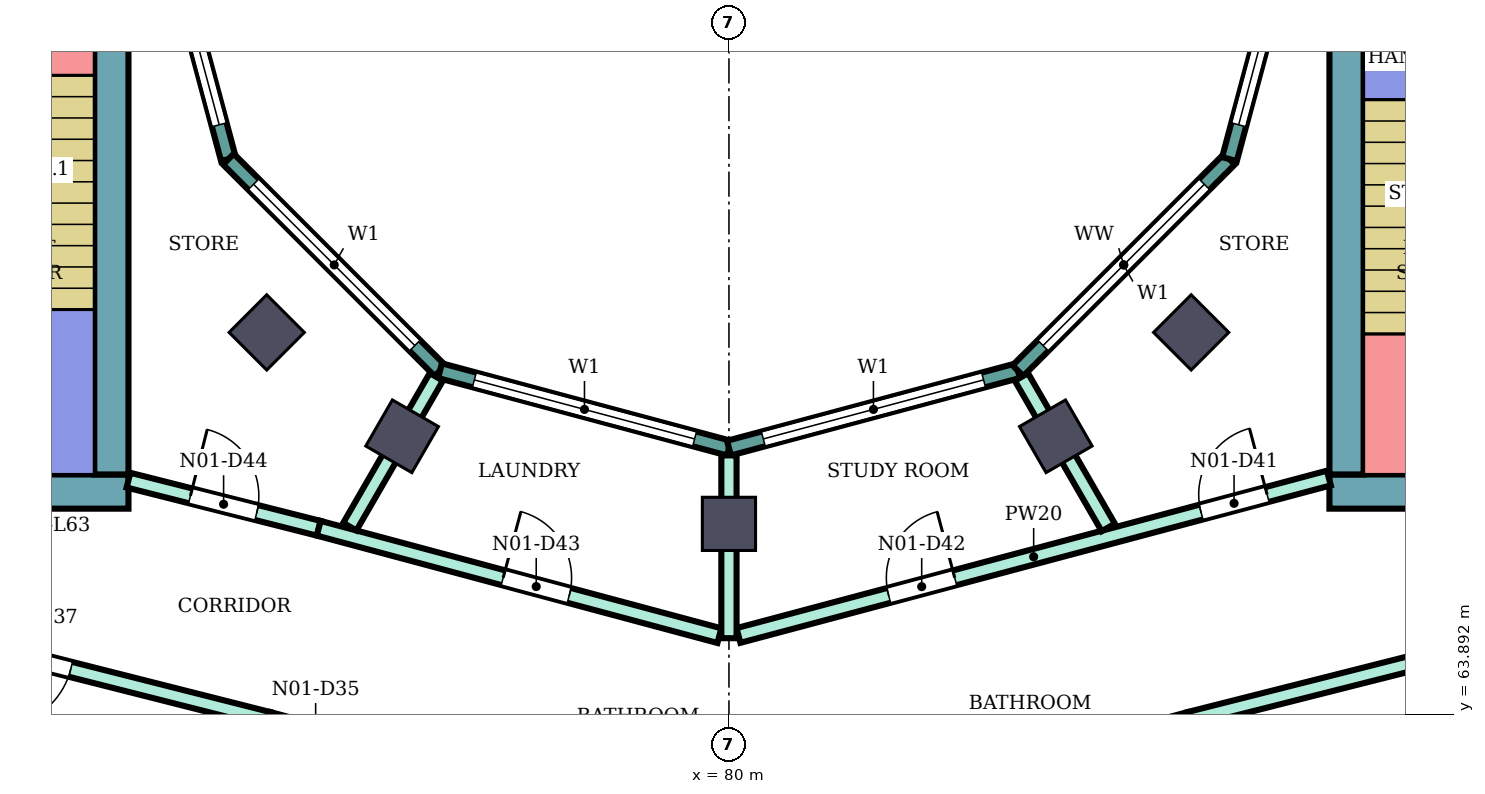
"""IFC4 building model, lengths in metres.
Left out: names, types, materials, properties, quantities, classifications, styles, units other than length and angle.
Written with IfcOpenShell. Run it as: python <this file> out.ifc"""

import sys

from ifc_helpers import new_model, si_unit, direction, frame, frame_2d, origin, origin_2d, place, context, subcontext, project, spatial, rectangle, extrude, element, fill, save


model = new_model("IFC4")
c1 = context("Model", 3, precision=1e-05, world=origin(), true_north=direction((0.0, 1.0)))
c2 = subcontext(c1, "Body", "Model", "MODEL_VIEW")
j1 = project(units=[si_unit("LENGTHUNIT", "METRE"), si_unit("PLANEANGLEUNIT", "RADIAN")], contexts=[c1])
p1 = place(None, origin())
s1 = spatial("IfcSite", under=j1, at=p1, CompositionType="ELEMENT")
p2 = place(p1, origin())
s2 = spatial("IfcBuilding", under=s1, at=p2, CompositionType="ELEMENT")
p3 = place(p2, frame((0.0, 0.0, 275.7)))
s3 = spatial("IfcBuildingStorey", under=s2, at=p3, CompositionType="ELEMENT", Elevation=275.7)
for number, where, z_axis, x_axis in (
    (1, (73.919, 68.919, 0.0), (0.0, 0.0, 1.0), (-0.707, -0.707, 0.0)),
    (2, (75.7, 67.552, 0.0), (0.0, 0.0, 1.0), (-0.5, -0.866, 0.0)),
    (3, (80.0, 66.4, 0.0), (0.0, 0.0, 1.0), (0.0, -1.0, 0.0)),
    (4, (84.3, 67.552, 0.0), (0.0, 0.0, 1.0), (0.5, -0.866, 0.0)),
    (5, (86.081, 68.919, 0.0), (0.0, 0.0, 1.0), (0.707, -0.707, 0.0)),
):
    element("IfcColumn", number, at=place(p3, frame(where, z_axis=z_axis, x_axis=x_axis)), inside=s3, PredefinedType="COLUMN", context=c2, shape_type="SweptSolid", body=[
        extrude(rectangle(XDim=0.7, YDim=0.7, at=origin_2d()), origin(), (0.0, 0.0, 1.0), 4.2),
    ])
p4 = place(p3, frame((87.9, 66.825, 0.0), z_axis=(0.0, 0.0, 1.0), x_axis=(1.0, 0.0, 0.0)))
e6 = element("IfcWall", 6, at=p4, inside=s3, PredefinedType="SHEAR", context=c2, shape_type="SweptSolid", body=[
    extrude(rectangle(XDim=13.55, YDim=0.45, at=frame_2d((6.775, 0.0))), origin(), (0.0, 0.0, 1.0), 3.88),
])
p5 = place(p4, frame((4.2, 0.0, 0.0)))
e7 = element("IfcOpeningElement", 7, at=p5, cuts=e6, PredefinedType="OPENING", context=c2, shape_type="SweptSolid", body=[
    extrude(rectangle(XDim=2.4, YDim=2.4, at=frame_2d((1.2, 1.2))), frame((0.0, 0.235, 0.0), z_axis=(0.0, -1.0, 0.0), x_axis=(1.0, 0.0, 0.0)), (0.0, 0.0, 1.0), 0.47),
])
p6 = place(p3, frame((88.125, 67.05, 0.0), z_axis=(0.0, 0.0, 1.0), x_axis=(0.0, 1.0, 0.0)))
e8 = element("IfcWall", 8, at=p6, inside=s3, PredefinedType="SHEAR", context=c2, shape_type="SweptSolid", body=[
    extrude(rectangle(XDim=7.95, YDim=0.45, at=frame_2d((3.975, 0.0))), origin(), (0.0, 0.0, 1.0), 3.88),
])
p7 = place(p3, frame((72.1, 66.825, 0.0), z_axis=(0.0, 0.0, 1.0), x_axis=(-1.0, 0.0, 0.0)))
e9 = element("IfcWall", 9, at=p7, inside=s3, PredefinedType="SHEAR", context=c2, shape_type="SweptSolid", body=[
    extrude(rectangle(XDim=13.55, YDim=0.45, at=frame_2d((6.775, 0.0))), origin(), (0.0, 0.0, 1.0), 3.88),
])
p8 = place(p7, frame((4.2, 0.0, 0.0)))
e10 = element("IfcOpeningElement", 10, at=p8, cuts=e9, PredefinedType="OPENING", context=c2, shape_type="SweptSolid", body=[
    extrude(rectangle(XDim=2.4, YDim=2.4, at=frame_2d((1.2, 1.2))), frame((0.0, 0.235, 0.0), z_axis=(0.0, -1.0, 0.0), x_axis=(1.0, 0.0, 0.0)), (0.0, 0.0, 1.0), 0.47),
])
p9 = place(p3, frame((71.875, 75.0, 0.0), z_axis=(0.0, 0.0, 1.0), x_axis=(0.0, -1.0, 0.0)))
e11 = element("IfcWall", 11, at=p9, inside=s3, PredefinedType="SHEAR", context=c2, shape_type="SweptSolid", body=[
    extrude(rectangle(XDim=7.95, YDim=0.45, at=frame_2d((3.975, 0.0))), origin(), (0.0, 0.0, 1.0), 3.88),
])
p10 = place(p3, frame((72.396, 75.0, 0.0), z_axis=(0.0, 0.0, 1.0), x_axis=(0.258789828301, -0.965933654434, 0.0)))
e12 = element("IfcWall", 12, at=p10, inside=s3, PredefinedType="NOTDEFINED", context=c2, shape_type="SweptSolid", body=[
    extrude(rectangle(XDim=3.936, YDim=0.2, at=frame_2d((1.968, 0.0))), origin(), (0.0, 0.0, 1.0), 4.2),
])
p11 = place(p10, frame((0.468, 0.0, 0.9)))
e13 = element("IfcOpeningElement", 13, at=p11, cuts=e12, PredefinedType="OPENING", context=c2, shape_type="SweptSolid", body=[
    extrude(rectangle(XDim=3.0, YDim=2.3, at=frame_2d((1.5, 1.15))), frame((0.0, 0.11, 0.0), z_axis=(0.0, -1.0, 0.0), x_axis=(1.0, 0.0, 0.0)), (0.0, 0.0, 1.0), 0.22),
])
p12 = place(p3, frame((73.415, 71.198, 0.0), z_axis=(0.0, 0.0, 1.0), x_axis=(0.707106781187, -0.707106781187, 0.0)))
e14 = element("IfcWall", 14, at=p12, inside=s3, PredefinedType="NOTDEFINED", context=c2, shape_type="SweptSolid", body=[
    extrude(rectangle(XDim=3.936, YDim=0.2, at=frame_2d((1.968, 0.0))), origin(), (0.0, 0.0, 1.0), 4.2),
])
p13 = place(p12, frame((0.468, 0.0, 0.9)))
e15 = element("IfcOpeningElement", 15, at=p13, cuts=e14, PredefinedType="OPENING", context=c2, shape_type="SweptSolid", body=[
    extrude(rectangle(XDim=3.0, YDim=2.3, at=frame_2d((1.5, 1.15))), frame((0.0, 0.11, 0.0), z_axis=(0.0, -1.0, 0.0), x_axis=(1.0, 0.0, 0.0)), (0.0, 0.0, 1.0), 0.22),
])
p14 = place(p3, frame((76.198, 68.415, 0.0), z_axis=(0.0, 0.0, 1.0), x_axis=(0.965933654434, -0.258789828301, 0.0)))
e16 = element("IfcWall", 16, at=p14, inside=s3, PredefinedType="NOTDEFINED", context=c2, shape_type="SweptSolid", body=[
    extrude(rectangle(XDim=3.936, YDim=0.2, at=frame_2d((1.968, 0.0))), origin(), (0.0, 0.0, 1.0), 4.2),
])
p15 = place(p14, frame((0.468, 0.0, 0.9)))
e17 = element("IfcOpeningElement", 17, at=p15, cuts=e16, PredefinedType="OPENING", context=c2, shape_type="SweptSolid", body=[
    extrude(rectangle(XDim=3.0, YDim=2.3, at=frame_2d((1.5, 1.15))), frame((0.0, 0.11, 0.0), z_axis=(0.0, -1.0, 0.0), x_axis=(1.0, 0.0, 0.0)), (0.0, 0.0, 1.0), 0.22),
])
p16 = place(p3, frame((80.0, 67.396, 0.0), z_axis=(0.0, 0.0, 1.0), x_axis=(0.965933654434, 0.258789828301, 0.0)))
e18 = element("IfcWall", 18, at=p16, inside=s3, PredefinedType="NOTDEFINED", context=c2, shape_type="SweptSolid", body=[
    extrude(rectangle(XDim=3.936, YDim=0.2, at=frame_2d((1.968, 0.0))), origin(), (0.0, 0.0, 1.0), 4.2),
])
p17 = place(p16, frame((0.468, 0.0, 0.9)))
e19 = element("IfcOpeningElement", 19, at=p17, cuts=e18, PredefinedType="OPENING", context=c2, shape_type="SweptSolid", body=[
    extrude(rectangle(XDim=3.0, YDim=2.3, at=frame_2d((1.5, 1.15))), frame((0.0, 0.11, 0.0), z_axis=(0.0, -1.0, 0.0), x_axis=(1.0, 0.0, 0.0)), (0.0, 0.0, 1.0), 0.22),
])
p18 = place(p3, frame((83.802, 68.415, 0.0), z_axis=(0.0, 0.0, 1.0), x_axis=(0.707106781187, 0.707106781187, 0.0)))
e20 = element("IfcWall", 20, at=p18, inside=s3, PredefinedType="NOTDEFINED", context=c2, shape_type="SweptSolid", body=[
    extrude(rectangle(XDim=3.936, YDim=0.2, at=frame_2d((1.968, 0.0))), origin(), (0.0, 0.0, 1.0), 4.2),
])
p19 = place(p18, frame((0.468, 0.0, 0.9)))
e21 = element("IfcOpeningElement", 21, at=p19, cuts=e20, PredefinedType="OPENING", context=c2, shape_type="SweptSolid", body=[
    extrude(rectangle(XDim=3.0, YDim=2.3, at=frame_2d((1.5, 1.15))), frame((0.0, 0.11, 0.0), z_axis=(0.0, -1.0, 0.0), x_axis=(1.0, 0.0, 0.0)), (0.0, 0.0, 1.0), 0.22),
])
p20 = place(p3, frame((86.585, 71.198, 0.0), z_axis=(0.0, 0.0, 1.0), x_axis=(0.258789828301, 0.965933654434, 0.0)))
e22 = element("IfcWall", 22, at=p20, inside=s3, PredefinedType="NOTDEFINED", context=c2, shape_type="SweptSolid", body=[
    extrude(rectangle(XDim=3.936, YDim=0.2, at=frame_2d((1.968, 0.0))), origin(), (0.0, 0.0, 1.0), 4.2),
])
p21 = place(p20, frame((0.468, 0.0, 0.9)))
e23 = element("IfcOpeningElement", 23, at=p21, cuts=e22, PredefinedType="OPENING", context=c2, shape_type="SweptSolid", body=[
    extrude(rectangle(XDim=3.0, YDim=2.3, at=frame_2d((1.5, 1.15))), frame((0.0, 0.11, 0.0), z_axis=(0.0, -1.0, 0.0), x_axis=(1.0, 0.0, 0.0)), (0.0, 0.0, 1.0), 0.22),
])
p22 = place(p3, frame((68.2, 65.28, 0.0), z_axis=(0.0, 0.0, 1.0), x_axis=(0.969440802773, -0.24532535523, 0.0)))
e24 = element("IfcWall", 24, at=p22, inside=s3, PredefinedType="PARTITIONING", context=c2, shape_type="SweptSolid", body=[
    extrude(rectangle(XDim=5.928, YDim=0.2, at=frame_2d((2.964, 0.0))), origin(), (0.0, 0.0, 1.0), 3.75),
])
p23 = place(p22, frame((2.239, 0.0, 0.0)))
e25 = element("IfcOpeningElement", 25, at=p23, cuts=e24, PredefinedType="OPENING", context=c2, shape_type="SweptSolid", body=[
    extrude(rectangle(XDim=1.0, YDim=2.1, at=frame_2d((0.5, 1.05))), frame((0.0, 0.11, 0.0), z_axis=(0.0, -1.0, 0.0), x_axis=(1.0, 0.0, 0.0)), (0.0, 0.0, 1.0), 0.22),
])
p24 = place(p3, frame((72.1, 66.975, 0.0), z_axis=(0.0, 0.0, 1.0), x_axis=(0.969471314457, -0.245204752086, 0.0)))
e26 = element("IfcWall", 26, at=p24, inside=s3, PredefinedType="PARTITIONING", context=c2, shape_type="SweptSolid", body=[
    extrude(rectangle(XDim=2.582, YDim=0.2, at=frame_2d((1.291, 0.0))), origin(), (0.0, 0.0, 1.0), 3.75),
])
p25 = place(p24, frame((0.841, 0.0, 0.0)))
e27 = element("IfcOpeningElement", 27, at=p25, cuts=e26, PredefinedType="OPENING", context=c2, shape_type="SweptSolid", body=[
    extrude(rectangle(XDim=0.9, YDim=2.1, at=frame_2d((0.45, 1.05))), frame((0.0, 0.11, 0.0), z_axis=(0.0, -1.0, 0.0), x_axis=(1.0, 0.0, 0.0)), (0.0, 0.0, 1.0), 0.22),
])
p26 = place(p3, frame((73.947, 63.826, 0.0), z_axis=(0.0, 0.0, 1.0), x_axis=(0.965872508768, -0.25901794688, 0.0)))
e28 = element("IfcWall", 28, at=p26, inside=s3, PredefinedType="PARTITIONING", context=c2, shape_type="SweptSolid", body=[
    extrude(rectangle(XDim=6.177, YDim=0.2, at=frame_2d((3.088, 0.0))), origin(), (0.0, 0.0, 1.0), 3.75),
])
p27 = place(p26, frame((4.885, 0.0, 0.0)))
e29 = element("IfcOpeningElement", 29, at=p27, cuts=e28, PredefinedType="OPENING", context=c2, shape_type="SweptSolid", body=[
    extrude(rectangle(XDim=1.0, YDim=2.1, at=frame_2d((0.5, 1.05))), frame((0.0, 0.11, 0.0), z_axis=(0.0, -1.0, 0.0), x_axis=(1.0, 0.0, 0.0)), (0.0, 0.0, 1.0), 0.22),
])
p28 = place(p26, frame((0.137, 0.0, 0.0)))
e30 = element("IfcOpeningElement", 30, at=p28, cuts=e28, PredefinedType="OPENING", context=c2, shape_type="SweptSolid", body=[
    extrude(rectangle(XDim=1.0, YDim=2.1, at=frame_2d((0.5, 1.05))), frame((0.0, 0.11, 0.0), z_axis=(0.0, -1.0, 0.0), x_axis=(1.0, 0.0, 0.0)), (0.0, 0.0, 1.0), 0.22),
])
p29 = place(p3, frame((74.603, 66.342, 0.0), z_axis=(0.0, 0.0, 1.0), x_axis=(0.965920893652, -0.258837453254, 0.0)))
e31 = element("IfcWall", 31, at=p29, inside=s3, PredefinedType="PARTITIONING", context=c2, shape_type="SweptSolid", body=[
    extrude(rectangle(XDim=5.458, YDim=0.2, at=frame_2d((2.729, 0.0))), origin(), (0.0, 0.0, 1.0), 3.75),
])
p30 = place(p29, frame((2.512, 0.0, 0.0)))
e32 = element("IfcOpeningElement", 32, at=p30, cuts=e31, PredefinedType="OPENING", context=c2, shape_type="SweptSolid", body=[
    extrude(rectangle(XDim=0.9, YDim=2.1, at=frame_2d((0.45, 1.05))), frame((0.0, 0.11, 0.0), z_axis=(0.0, -1.0, 0.0), x_axis=(1.0, 0.0, 0.0)), (0.0, 0.0, 1.0), 0.22),
])
p31 = place(p3, frame((75.012, 66.363, 0.0), z_axis=(0.0, 0.0, 1.0), x_axis=(0.500097042406, 0.865969369075, 0.0)))
e33 = element("IfcWall", 33, at=p31, inside=s3, PredefinedType="PARTITIONING", context=c2, shape_type="SweptSolid", body=[
    extrude(rectangle(XDim=2.275, YDim=0.2, at=frame_2d((1.138, 0.0))), origin(), (0.0, 0.0, 1.0), 3.75),
])
p32 = place(p3, frame((80.125, 64.932, 0.0), z_axis=(0.0, 0.0, 1.0), x_axis=(0.966236955806, 0.257655089674, 0.0)))
e34 = element("IfcWall", 34, at=p32, inside=s3, PredefinedType="PARTITIONING", context=c2, shape_type="SweptSolid", body=[
    extrude(rectangle(XDim=8.039, YDim=0.2, at=frame_2d((4.02, 0.0))), origin(), (0.0, 0.0, 1.0), 3.75),
])
p33 = place(p32, frame((6.298, 0.0, 0.0)))
e35 = element("IfcOpeningElement", 35, at=p33, cuts=e34, PredefinedType="OPENING", context=c2, shape_type="SweptSolid", body=[
    extrude(rectangle(XDim=0.9, YDim=2.1, at=frame_2d((0.45, 1.05))), frame((0.0, 0.11, 0.0), z_axis=(0.0, -1.0, 0.0), x_axis=(1.0, 0.0, 0.0)), (0.0, 0.0, 1.0), 0.22),
])
p34 = place(p32, frame((2.045, 0.0, 0.0)))
e36 = element("IfcOpeningElement", 36, at=p34, cuts=e34, PredefinedType="OPENING", context=c2, shape_type="SweptSolid", body=[
    extrude(rectangle(XDim=0.9, YDim=2.1, at=frame_2d((0.45, 1.05))), frame((0.0, 0.11, 0.0), z_axis=(0.0, -1.0, 0.0), x_axis=(1.0, 0.0, 0.0)), (0.0, 0.0, 1.0), 0.22),
])
p35 = place(p3, frame((80.0, 62.204, 0.0), z_axis=(0.0, 0.0, 1.0), x_axis=(0.965960221635, 0.258690645788, 0.0)))
e37 = element("IfcWall", 37, at=p35, inside=s3, PredefinedType="PARTITIONING", context=c2, shape_type="SweptSolid", body=[
    extrude(rectangle(XDim=6.267, YDim=0.2, at=frame_2d((3.133, 0.0))), origin(), (0.0, 0.0, 1.0), 3.75),
])
p36 = place(p35, frame((0.382, 0.0, 0.0)))
e38 = element("IfcOpeningElement", 38, at=p36, cuts=e37, PredefinedType="OPENING", context=c2, shape_type="SweptSolid", body=[
    extrude(rectangle(XDim=1.0, YDim=2.1, at=frame_2d((0.5, 1.05))), frame((0.0, 0.11, 0.0), z_axis=(0.0, -1.0, 0.0), x_axis=(1.0, 0.0, 0.0)), (0.0, 0.0, 1.0), 0.22),
])
p37 = place(p3, frame((80.0, 64.896, 0.0), z_axis=(0.0, 0.0, 1.0), x_axis=(0.0, 1.0, 0.0)))
e39 = element("IfcWall", 39, at=p37, inside=s3, PredefinedType="PARTITIONING", context=c2, shape_type="SweptSolid", body=[
    extrude(rectangle(XDim=2.405, YDim=0.2, at=frame_2d((1.203, 0.0))), origin(), (0.0, 0.0, 1.0), 3.75),
])
p38 = place(p3, frame((83.848, 68.332, 0.0), z_axis=(0.0, 0.0, 1.0), x_axis=(0.499953638813, -0.866052168773, 0.0)))
e40 = element("IfcWall", 40, at=p38, inside=s3, PredefinedType="PARTITIONING", context=c2, shape_type="SweptSolid", body=[
    extrude(rectangle(XDim=2.285, YDim=0.2, at=frame_2d((1.143, 0.0))), origin(), (0.0, 0.0, 1.0), 3.75),
])
p39 = place(p3, frame((86.053, 63.826, 0.0), z_axis=(0.0, 0.0, 1.0), x_axis=(0.969490004987, 0.245130843083, 0.0)))
e41 = element("IfcWall", 41, at=p39, inside=s3, PredefinedType="PARTITIONING", context=c2, shape_type="SweptSolid", body=[
    extrude(rectangle(XDim=5.908, YDim=0.2, at=frame_2d((2.954, 0.0))), origin(), (0.0, 0.0, 1.0), 3.75),
])
p40 = place(p11, origin())
e42 = element("IfcWindow", 42, at=p40, inside=s3, PartitioningType="SINGLE_PANEL", PredefinedType="WINDOW", context=c2, shape_type="SweptSolid", body=[
    extrude(rectangle(XDim=3.0, YDim=2.3, at=frame_2d((1.5, 1.15))), frame((0.0, 0.03, 0.0), z_axis=(0.0, -1.0, 0.0), x_axis=(1.0, 0.0, 0.0)), (0.0, 0.0, 1.0), 0.06),
])
fill(e13, e42)
p41 = place(p13, origin())
e43 = element("IfcWindow", 43, at=p41, inside=s3, PartitioningType="SINGLE_PANEL", PredefinedType="WINDOW", context=c2, shape_type="SweptSolid", body=[
    extrude(rectangle(XDim=3.0, YDim=2.3, at=frame_2d((1.5, 1.15))), frame((0.0, 0.03, 0.0), z_axis=(0.0, -1.0, 0.0), x_axis=(1.0, 0.0, 0.0)), (0.0, 0.0, 1.0), 0.06),
])
fill(e15, e43)
p42 = place(p15, origin())
e44 = element("IfcWindow", 44, at=p42, inside=s3, PartitioningType="SINGLE_PANEL", PredefinedType="WINDOW", context=c2, shape_type="SweptSolid", body=[
    extrude(rectangle(XDim=3.0, YDim=2.3, at=frame_2d((1.5, 1.15))), frame((0.0, 0.03, 0.0), z_axis=(0.0, -1.0, 0.0), x_axis=(1.0, 0.0, 0.0)), (0.0, 0.0, 1.0), 0.06),
])
fill(e17, e44)
p43 = place(p17, origin())
e45 = element("IfcWindow", 45, at=p43, inside=s3, PartitioningType="SINGLE_PANEL", PredefinedType="WINDOW", context=c2, shape_type="SweptSolid", body=[
    extrude(rectangle(XDim=3.0, YDim=2.3, at=frame_2d((1.5, 1.15))), frame((0.0, 0.03, 0.0), z_axis=(0.0, -1.0, 0.0), x_axis=(1.0, 0.0, 0.0)), (0.0, 0.0, 1.0), 0.06),
])
fill(e19, e45)
p44 = place(p19, origin())
e46 = element("IfcWindow", 46, at=p44, inside=s3, PartitioningType="SINGLE_PANEL", PredefinedType="WINDOW", context=c2, shape_type="SweptSolid", body=[
    extrude(rectangle(XDim=3.0, YDim=2.3, at=frame_2d((1.5, 1.15))), frame((0.0, 0.03, 0.0), z_axis=(0.0, -1.0, 0.0), x_axis=(1.0, 0.0, 0.0)), (0.0, 0.0, 1.0), 0.06),
])
fill(e21, e46)
p45 = place(p21, origin())
e47 = element("IfcWindow", 47, at=p45, inside=s3, PartitioningType="SINGLE_PANEL", PredefinedType="WINDOW", context=c2, shape_type="SweptSolid", body=[
    extrude(rectangle(XDim=3.0, YDim=2.3, at=frame_2d((1.5, 1.15))), frame((0.0, 0.03, 0.0), z_axis=(0.0, -1.0, 0.0), x_axis=(1.0, 0.0, 0.0)), (0.0, 0.0, 1.0), 0.06),
])
fill(e23, e47)
p46 = place(p23, frame((1.0, 0.0, 0.0), z_axis=(0.0, 0.0, 1.0), x_axis=(-1.0, 0.0, 0.0)))
e48 = element("IfcDoor", 48, at=p46, inside=s3, OperationType="SINGLE_SWING_RIGHT", PredefinedType="DOOR", context=c2, shape_type="SweptSolid", body=[
    extrude(rectangle(XDim=1.0, YDim=2.1, at=frame_2d((0.5, 1.05))), frame((0.0, 0.025, 0.0), z_axis=(0.0, -1.0, 0.0), x_axis=(1.0, 0.0, 0.0)), (0.0, 0.0, 1.0), 0.05),
])
fill(e25, e48)
p47 = place(p33, origin())
e49 = element("IfcDoor", 49, at=p47, inside=s3, OperationType="SINGLE_SWING_RIGHT", PredefinedType="DOOR", context=c2, shape_type="SweptSolid", body=[
    extrude(rectangle(XDim=0.9, YDim=2.1, at=frame_2d((0.45, 1.05))), frame((0.0, 0.025, 0.0), z_axis=(0.0, -1.0, 0.0), x_axis=(1.0, 0.0, 0.0)), (0.0, 0.0, 1.0), 0.05),
])
fill(e35, e49)
p48 = place(p34, origin())
e50 = element("IfcDoor", 50, at=p48, inside=s3, OperationType="SINGLE_SWING_RIGHT", PredefinedType="DOOR", context=c2, shape_type="SweptSolid", body=[
    extrude(rectangle(XDim=0.9, YDim=2.1, at=frame_2d((0.45, 1.05))), frame((0.0, 0.025, 0.0), z_axis=(0.0, -1.0, 0.0), x_axis=(1.0, 0.0, 0.0)), (0.0, 0.0, 1.0), 0.05),
])
fill(e36, e50)
p49 = place(p30, origin())
e51 = element("IfcDoor", 51, at=p49, inside=s3, OperationType="SINGLE_SWING_LEFT", PredefinedType="DOOR", context=c2, shape_type="SweptSolid", body=[
    extrude(rectangle(XDim=0.9, YDim=2.1, at=frame_2d((0.45, 1.05))), frame((0.0, 0.025, 0.0), z_axis=(0.0, -1.0, 0.0), x_axis=(1.0, 0.0, 0.0)), (0.0, 0.0, 1.0), 0.05),
])
fill(e32, e51)
p50 = place(p25, origin())
e52 = element("IfcDoor", 52, at=p50, inside=s3, OperationType="SINGLE_SWING_LEFT", PredefinedType="DOOR", context=c2, shape_type="SweptSolid", body=[
    extrude(rectangle(XDim=0.9, YDim=2.1, at=frame_2d((0.45, 1.05))), frame((0.0, 0.025, 0.0), z_axis=(0.0, -1.0, 0.0), x_axis=(1.0, 0.0, 0.0)), (0.0, 0.0, 1.0), 0.05),
])
fill(e27, e52)
save(model, sys.argv[1])
